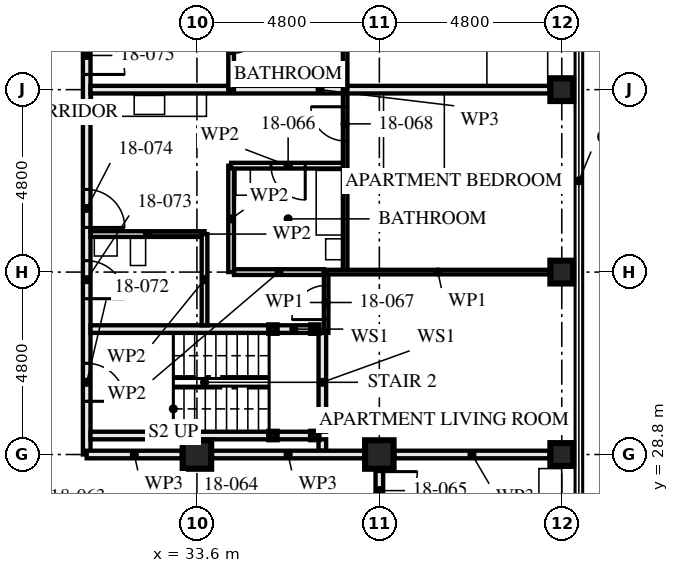
"""IFC4 building model, lengths in metres.
Left out: names, types, materials, properties, quantities, classifications, styles, units other than length and angle.
Written with IfcOpenShell. Run it as: python <this file> out.ifc"""

import sys

from ifc_helpers import new_model, si_unit, direction, frame, frame_2d, origin, origin_2d, place, context, subcontext, project, spatial, rectangle, hollow_rectangle, extrude, element, fill, save


model = new_model("IFC4")
c1 = context("Model", 3, precision=1e-05, world=origin(), true_north=direction((0.0, 1.0)))
c2 = subcontext(c1, "Body", "Model", "MODEL_VIEW")
j1 = project(units=[si_unit("LENGTHUNIT", "METRE"), si_unit("PLANEANGLEUNIT", "RADIAN")], contexts=[c1])
p1 = place(None, origin())
s1 = spatial("IfcSite", under=j1, at=p1, CompositionType="ELEMENT")
p2 = place(p1, origin())
s2 = spatial("IfcBuilding", under=s1, at=p2, CompositionType="ELEMENT")
p3 = place(p2, frame((0.0, 0.0, 69.0)))
s3 = spatial("IfcBuildingStorey", under=s2, at=p3, CompositionType="ELEMENT", Elevation=69.0)
for number, where, z_axis, x_axis in (
    (1, (33.6, 28.8, 0.0), (0.0, 0.0, 1.0), (0.0, 1.0, 0.0)),
    (2, (38.4, 28.8, 0.0), (0.0, 0.0, 1.0), (0.0, 1.0, 0.0)),
):
    element("IfcColumn", number, at=place(p3, frame(where, z_axis=z_axis, x_axis=x_axis)), inside=s3, PredefinedType="COLUMN", context=c2, shape_type="SweptSolid", body=[
        extrude(hollow_rectangle(XDim=0.75, YDim=0.75, WallThickness=0.08, at=origin_2d()), origin(), (0.0, 0.0, 1.0), 3.5),
    ])
for number, where, z_axis, x_axis in (
    (3, (43.2, 28.8, 0.0), (0.0, 0.0, 1.0), (0.0, 1.0, 0.0)),
    (4, (43.2, 33.6, 0.0), (0.0, 0.0, 1.0), (1.0, 0.0, 0.0)),
    (5, (43.2, 38.4, 0.0), (0.0, 0.0, 1.0), (1.0, 0.0, 0.0)),
):
    element("IfcColumn", number, at=place(p3, frame(where, z_axis=z_axis, x_axis=x_axis)), inside=s3, PredefinedType="COLUMN", context=c2, shape_type="SweptSolid", body=[
        extrude(hollow_rectangle(XDim=0.6, YDim=0.6, WallThickness=0.08, at=origin_2d()), origin(), (0.0, 0.0, 1.0), 3.5),
    ])
for number, where, z_axis, x_axis in (
    (6, (36.7, 29.3, 0.0), (0.0, 0.0, 1.0), (1.0, 0.0, 0.0)),
    (7, (36.7, 32.1, 0.0), (0.0, 0.0, 1.0), (1.0, 0.0, 0.0)),
    (8, (35.6, 29.3, 0.0), (0.0, 0.0, 1.0), (1.0, 0.0, 0.0)),
    (9, (35.6, 32.1, 0.0), (0.0, 0.0, 1.0), (1.0, 0.0, 0.0)),
):
    element("IfcColumn", number, at=place(p3, frame(where, z_axis=z_axis, x_axis=x_axis)), inside=s3, PredefinedType="COLUMN", context=c2, shape_type="SweptSolid", body=[
        extrude(hollow_rectangle(XDim=0.2, YDim=0.2, WallThickness=0.008, at=origin_2d()), origin(), (0.0, 0.0, 1.0), 3.33),
    ])
p4 = place(p3, frame((38.4, 26.8, 0.0), z_axis=(0.0, 0.0, 1.0), x_axis=(0.0, 1.0, 0.0)))
e10 = element("IfcWall", 10, at=p4, inside=s3, PredefinedType="PARTITIONING", context=c2, shape_type="SweptSolid", body=[
    extrude(rectangle(XDim=1.605, YDim=0.2, at=frame_2d((0.802, 0.0))), origin(), (0.0, 0.0, 1.0), 3.33),
])
p5 = place(p4, frame((0.55, 0.0, 0.0)))
e11 = element("IfcOpeningElement", 11, at=p5, cuts=e10, PredefinedType="OPENING", context=c2, shape_type="SweptSolid", body=[
    extrude(rectangle(XDim=1.0, YDim=2.1, at=frame_2d((0.5, 1.05))), frame((0.0, 0.111, 0.0), z_axis=(0.0, -1.0, 0.0), x_axis=(1.0, 0.0, 0.0)), (0.0, 0.0, 1.0), 0.221),
])
p6 = place(p3, frame((36.6, 29.3, 0.0), z_axis=(0.0, 0.0, 1.0), x_axis=(-1.0, 0.0, 0.0)))
e12 = element("IfcWall", 12, at=p6, inside=s3, PredefinedType="SOLIDWALL", context=c2, shape_type="SweptSolid", body=[
    extrude(rectangle(XDim=0.9, YDim=0.2, at=frame_2d((0.45, 0.0))), origin(), (0.0, 0.0, 1.0), 2.99),
])
p7 = place(p3, frame((35.5, 29.3, 0.0), z_axis=(0.0, 0.0, 1.0), x_axis=(-1.0, 0.0, 0.0)))
e13 = element("IfcWall", 13, at=p7, inside=s3, PredefinedType="SOLIDWALL", context=c2, shape_type="SweptSolid", body=[
    extrude(rectangle(XDim=4.7, YDim=0.2, at=frame_2d((2.35, 0.0))), origin(), (0.0, 0.0, 1.0), 2.99),
])
p8 = place(p3, frame((36.6, 32.1, 0.0), z_axis=(0.0, 0.0, 1.0), x_axis=(-1.0, 0.0, 0.0)))
e14 = element("IfcWall", 14, at=p8, inside=s3, PredefinedType="SOLIDWALL", context=c2, shape_type="SweptSolid", body=[
    extrude(rectangle(XDim=0.9, YDim=0.2, at=frame_2d((0.45, 0.0))), origin(), (0.0, 0.0, 1.0), 2.99),
])
p9 = place(p3, frame((35.5, 32.1, 0.0), z_axis=(0.0, 0.0, 1.0), x_axis=(-1.0, 0.0, 0.0)))
e15 = element("IfcWall", 15, at=p9, inside=s3, PredefinedType="SOLIDWALL", context=c2, shape_type="SweptSolid", body=[
    extrude(rectangle(XDim=4.7, YDim=0.2, at=frame_2d((2.35, 0.0))), origin(), (0.0, 0.0, 1.0), 2.99),
])
p10 = place(p3, frame((36.9, 28.9, 0.0), z_axis=(0.0, 0.0, 1.0), x_axis=(0.0, 1.0, 0.0)))
e16 = element("IfcWall", 16, at=p10, inside=s3, PredefinedType="SOLIDWALL", context=c2, shape_type="SweptSolid", body=[
    extrude(rectangle(XDim=0.3, YDim=0.2, at=frame_2d((0.15, 0.0))), origin(), (0.0, 0.0, 1.0), 3.33),
])
p11 = place(p3, frame((36.9, 29.4, 0.0), z_axis=(0.0, 0.0, 1.0), x_axis=(0.0, 1.0, 0.0)))
e17 = element("IfcWall", 17, at=p11, inside=s3, PredefinedType="SOLIDWALL", context=c2, shape_type="SweptSolid", body=[
    extrude(rectangle(XDim=2.6, YDim=0.2, at=frame_2d((1.3, 0.0))), origin(), (0.0, 0.0, 1.0), 3.33),
])
p12 = place(p3, frame((33.8, 32.2, 0.0), z_axis=(0.0, 0.0, 1.0), x_axis=(0.0, 1.0, 0.0)))
e18 = element("IfcWall", 18, at=p12, inside=s3, PredefinedType="PARTITIONING", context=c2, shape_type="SweptSolid", body=[
    extrude(rectangle(XDim=2.4, YDim=0.15, at=frame_2d((1.2, 0.0))), origin(), (0.0, 0.0, 1.0), 2.55),
])
p13 = place(p3, frame((33.8, 34.6, 0.0), z_axis=(0.0, 0.0, 1.0), x_axis=(-1.0, 0.0, 0.0)))
e19 = element("IfcWall", 19, at=p13, inside=s3, PredefinedType="PARTITIONING", context=c2, shape_type="SweptSolid", body=[
    extrude(rectangle(XDim=3.0, YDim=0.15, at=frame_2d((1.5, 0.0))), origin(), (0.0, 0.0, 1.0), 3.33),
])
p14 = place(p3, frame((37.5, 36.4, 0.0), z_axis=(0.0, 0.0, 1.0), x_axis=(-1.0, 0.0, 0.0)))
e20 = element("IfcWall", 20, at=p14, inside=s3, PredefinedType="PARTITIONING", context=c2, shape_type="SweptSolid", body=[
    extrude(rectangle(XDim=3.0, YDim=0.15, at=frame_2d((1.5, 0.0))), origin(), (0.0, 0.0, 1.0), 3.33),
])
p15 = place(p14, frame((1.05, 0.0, 0.0)))
e21 = element("IfcOpeningElement", 21, at=p15, cuts=e20, PredefinedType="OPENING", context=c2, shape_type="SweptSolid", body=[
    extrude(rectangle(XDim=0.9, YDim=2.1, at=frame_2d((0.45, 1.05))), frame((0.0, 0.085, 0.0), z_axis=(0.0, -1.0, 0.0), x_axis=(1.0, 0.0, 0.0)), (0.0, 0.0, 1.0), 0.171),
])
p16 = place(p3, frame((34.5, 33.6, 0.0), z_axis=(0.0, 0.0, 1.0), x_axis=(0.0, 1.0, 0.0)))
e22 = element("IfcWall", 22, at=p16, inside=s3, PredefinedType="PARTITIONING", context=c2, shape_type="SweptSolid", body=[
    extrude(rectangle(XDim=2.8, YDim=0.15, at=frame_2d((1.4, 0.0))), origin(), (0.0, 0.0, 1.0), 3.33),
])
p17 = place(p3, frame((37.0, 32.0, 0.0), z_axis=(0.0, 0.0, 1.0), x_axis=(0.0, 1.0, 0.0)))
e23 = element("IfcWall", 23, at=p17, inside=s3, PredefinedType="PARTITIONING", context=c2, shape_type="SweptSolid", body=[
    extrude(rectangle(XDim=1.6, YDim=0.12, at=frame_2d((0.8, 0.0))), origin(), (0.0, 0.0, 1.0), 3.33),
])
p18 = place(p17, frame((0.35, 0.0, 0.0)))
e24 = element("IfcOpeningElement", 24, at=p18, cuts=e23, PredefinedType="OPENING", context=c2, shape_type="SweptSolid", body=[
    extrude(rectangle(XDim=0.9, YDim=2.1, at=frame_2d((0.45, 1.05))), frame((0.0, 0.071, 0.0), z_axis=(0.0, -1.0, 0.0), x_axis=(1.0, 0.0, 0.0)), (0.0, 0.0, 1.0), 0.141),
])
p19 = place(p3, frame((37.5, 33.6, 0.0), z_axis=(0.0, 0.0, 1.0), x_axis=(0.0, 1.0, 0.0)))
e25 = element("IfcWall", 25, at=p19, inside=s3, PredefinedType="PARTITIONING", context=c2, shape_type="SweptSolid", body=[
    extrude(rectangle(XDim=4.8, YDim=0.12, at=frame_2d((2.4, 0.0))), origin(), (0.0, 0.0, 1.0), 3.33),
])
p20 = place(p19, frame((3.45, 0.0, 0.0)))
e26 = element("IfcOpeningElement", 26, at=p20, cuts=e25, PredefinedType="OPENING", context=c2, shape_type="SweptSolid", body=[
    extrude(rectangle(XDim=0.9, YDim=2.1, at=frame_2d((0.45, 1.05))), frame((0.0, 0.071, 0.0), z_axis=(0.0, -1.0, 0.0), x_axis=(1.0, 0.0, 0.0)), (0.0, 0.0, 1.0), 0.141),
])
p21 = place(p3, frame((42.88, 33.6, 0.0), z_axis=(0.0, 0.0, 1.0), x_axis=(-1.0, 0.0, 0.0)))
e27 = element("IfcWall", 27, at=p21, inside=s3, PredefinedType="PARTITIONING", context=c2, shape_type="SweptSolid", body=[
    extrude(rectangle(XDim=5.88, YDim=0.12, at=frame_2d((2.94, 0.0))), origin(), (0.0, 0.0, 1.0), 2.55),
])
p22 = place(p3, frame((42.88, 38.4, 0.0), z_axis=(0.0, 0.0, 1.0), x_axis=(-1.0, 0.0, 0.0)))
e28 = element("IfcWall", 28, at=p22, inside=s3, PredefinedType="PARTITIONING", context=c2, shape_type="SweptSolid", body=[
    extrude(rectangle(XDim=12.08, YDim=0.2, at=frame_2d((6.04, 0.0))), origin(), (0.0, 0.0, 1.0), 2.55),
])
p23 = place(p3, frame((34.5, 38.4, 0.0), z_axis=(0.0, 0.0, 1.0), x_axis=(0.0, 1.0, 0.0)))
e29 = element("IfcWall", 29, at=p23, inside=s3, PredefinedType="PARTITIONING", context=c2, shape_type="SweptSolid", body=[
    extrude(rectangle(XDim=2.8, YDim=0.15, at=frame_2d((1.4, 0.0))), origin(), (0.0, 0.0, 1.0), 3.33),
])
p24 = place(p23, frame((0.95, 0.0, 0.0)))
e30 = element("IfcOpeningElement", 30, at=p24, cuts=e29, PredefinedType="OPENING", context=c2, shape_type="SweptSolid", body=[
    extrude(rectangle(XDim=0.9, YDim=2.1, at=frame_2d((0.45, 1.05))), frame((0.0, 0.085, 0.0), z_axis=(0.0, -1.0, 0.0), x_axis=(1.0, 0.0, 0.0)), (0.0, 0.0, 1.0), 0.171),
])
p25 = place(p3, frame((37.5, 38.4, 0.0), z_axis=(0.0, 0.0, 1.0), x_axis=(0.0, 1.0, 0.0)))
e31 = element("IfcWall", 31, at=p25, inside=s3, PredefinedType="PARTITIONING", context=c2, shape_type="SweptSolid", body=[
    extrude(rectangle(XDim=4.8, YDim=0.12, at=frame_2d((2.4, 0.0))), origin(), (0.0, 0.0, 1.0), 3.33),
])
p26 = place(p25, frame((3.45, 0.0, 0.0)))
e32 = element("IfcOpeningElement", 32, at=p26, cuts=e31, PredefinedType="OPENING", context=c2, shape_type="SweptSolid", body=[
    extrude(rectangle(XDim=0.9, YDim=2.1, at=frame_2d((0.45, 1.05))), frame((0.0, 0.071, 0.0), z_axis=(0.0, -1.0, 0.0), x_axis=(1.0, 0.0, 0.0)), (0.0, 0.0, 1.0), 0.141),
])
p27 = place(p3, frame((30.7, 28.8, 0.0), z_axis=(0.0, 0.0, 1.0), x_axis=(0.0, 1.0, 0.0)))
e33 = element("IfcWall", 33, at=p27, inside=s3, PredefinedType="PARTITIONING", context=c2, shape_type="SweptSolid", body=[
    extrude(rectangle(XDim=14.4, YDim=0.2, at=frame_2d((7.2, 0.0))), origin(), (0.0, 0.0, 1.0), 2.55),
])
p28 = place(p27, frame((1.4, 0.0, 0.0)))
e34 = element("IfcOpeningElement", 34, at=p28, cuts=e33, PredefinedType="OPENING", context=c2, shape_type="SweptSolid", body=[
    extrude(rectangle(XDim=1.0, YDim=2.1, at=frame_2d((0.5, 1.05))), frame((0.0, 0.111, 0.0), z_axis=(0.0, -1.0, 0.0), x_axis=(1.0, 0.0, 0.0)), (0.0, 0.0, 1.0), 0.221),
])
p29 = place(p27, frame((4.1, 0.0, 0.0)))
e35 = element("IfcOpeningElement", 35, at=p29, cuts=e33, PredefinedType="OPENING", context=c2, shape_type="SweptSolid", body=[
    extrude(rectangle(XDim=1.0, YDim=2.1, at=frame_2d((0.5, 1.05))), frame((0.0, 0.111, 0.0), z_axis=(0.0, -1.0, 0.0), x_axis=(1.0, 0.0, 0.0)), (0.0, 0.0, 1.0), 0.221),
])
p30 = place(p27, frame((5.975, 0.0, 0.0)))
e36 = element("IfcOpeningElement", 36, at=p30, cuts=e33, PredefinedType="OPENING", context=c2, shape_type="SweptSolid", body=[
    extrude(rectangle(XDim=1.0, YDim=2.1, at=frame_2d((0.5, 1.05))), frame((0.0, 0.111, 0.0), z_axis=(0.0, -1.0, 0.0), x_axis=(1.0, 0.0, 0.0)), (0.0, 0.0, 1.0), 0.221),
])
p31 = place(p27, frame((10.0, 0.0, 0.0)))
e37 = element("IfcOpeningElement", 37, at=p31, cuts=e33, PredefinedType="OPENING", context=c2, shape_type="SweptSolid", body=[
    extrude(rectangle(XDim=1.0, YDim=2.1, at=frame_2d((0.5, 1.05))), frame((0.0, 0.111, 0.0), z_axis=(0.0, -1.0, 0.0), x_axis=(1.0, 0.0, 0.0)), (0.0, 0.0, 1.0), 0.221),
])
p32 = place(p3, frame((42.88, 28.8, 0.0), z_axis=(0.0, 0.0, 1.0), x_axis=(-1.0, 0.0, 0.0)))
e38 = element("IfcWall", 38, at=p32, inside=s3, PredefinedType="PARTITIONING", context=c2, shape_type="SweptSolid", body=[
    extrude(rectangle(XDim=4.085, YDim=0.2, at=frame_2d((2.042, 0.0))), origin(), (0.0, 0.0, 1.0), 2.32),
])
p33 = place(p3, frame((38.005, 28.8, 0.0), z_axis=(0.0, 0.0, 1.0), x_axis=(-1.0, 0.0, 0.0)))
e39 = element("IfcWall", 39, at=p33, inside=s3, PredefinedType="PARTITIONING", context=c2, shape_type="SweptSolid", body=[
    extrude(rectangle(XDim=4.01, YDim=0.2, at=frame_2d((2.005, 0.0))), origin(), (0.0, 0.0, 1.0), 2.32),
])
p34 = place(p3, frame((33.205, 28.8, 0.0), z_axis=(0.0, 0.0, 1.0), x_axis=(-1.0, 0.0, 0.0)))
e40 = element("IfcWall", 40, at=p34, inside=s3, PredefinedType="PARTITIONING", context=c2, shape_type="SweptSolid", body=[
    extrude(rectangle(XDim=2.505, YDim=0.2, at=frame_2d((1.252, 0.0))), origin(), (0.0, 0.0, 1.0), 2.32),
])
p35 = place(p3, frame((36.94, 33.6, 0.0), z_axis=(0.0, 0.0, 1.0), x_axis=(-1.0, 0.0, 0.0)))
e41 = element("IfcWall", 41, at=p35, inside=s3, PredefinedType="PARTITIONING", context=c2, shape_type="SweptSolid", body=[
    extrude(rectangle(XDim=2.365, YDim=0.15, at=frame_2d((1.183, 0.0))), origin(), (0.0, 0.0, 1.0), 2.55),
])
p36 = place(p5, frame((1.0, 0.0, 0.0), z_axis=(0.0, 0.0, 1.0), x_axis=(-1.0, 0.0, 0.0)))
e42 = element("IfcDoor", 42, at=p36, inside=s3, OperationType="SINGLE_SWING_RIGHT", PredefinedType="DOOR", context=c2, shape_type="SweptSolid", body=[
    extrude(rectangle(XDim=1.0, YDim=2.1, at=frame_2d((0.5, 1.05))), frame((0.0, 0.027, 0.0), z_axis=(0.0, -1.0, 0.0), x_axis=(1.0, 0.0, 0.0)), (0.0, 0.0, 1.0), 0.054),
])
fill(e11, e42)
p37 = place(p15, origin())
e43 = element("IfcDoor", 43, at=p37, inside=s3, OperationType="SINGLE_SWING_RIGHT", PredefinedType="DOOR", context=c2, shape_type="SweptSolid", body=[
    extrude(rectangle(XDim=0.9, YDim=2.1, at=frame_2d((0.45, 1.05))), frame((0.0, 0.022, 0.0), z_axis=(0.0, -1.0, 0.0), x_axis=(1.0, 0.0, 0.0)), (0.0, 0.0, 1.0), 0.044),
])
fill(e21, e43)
p38 = place(p18, origin())
e44 = element("IfcDoor", 44, at=p38, inside=s3, OperationType="SINGLE_SWING_RIGHT", PredefinedType="DOOR", context=c2, shape_type="SweptSolid", body=[
    extrude(rectangle(XDim=0.9, YDim=2.1, at=frame_2d((0.45, 1.05))), frame((0.0, 0.022, 0.0), z_axis=(0.0, -1.0, 0.0), x_axis=(1.0, 0.0, 0.0)), (0.0, 0.0, 1.0), 0.044),
])
fill(e24, e44)
p39 = place(p20, origin())
e45 = element("IfcDoor", 45, at=p39, inside=s3, OperationType="SINGLE_SWING_LEFT", PredefinedType="DOOR", context=c2, shape_type="SweptSolid", body=[
    extrude(rectangle(XDim=0.9, YDim=2.1, at=frame_2d((0.45, 1.05))), frame((0.0, 0.022, 0.0), z_axis=(0.0, -1.0, 0.0), x_axis=(1.0, 0.0, 0.0)), (0.0, 0.0, 1.0), 0.044),
])
fill(e26, e45)
p40 = place(p24, frame((0.9, 0.0, 0.0), z_axis=(0.0, 0.0, 1.0), x_axis=(-1.0, 0.0, 0.0)))
e46 = element("IfcDoor", 46, at=p40, inside=s3, OperationType="SINGLE_SWING_RIGHT", PredefinedType="DOOR", context=c2, shape_type="SweptSolid", body=[
    extrude(rectangle(XDim=0.9, YDim=2.1, at=frame_2d((0.45, 1.05))), frame((0.0, 0.022, 0.0), z_axis=(0.0, -1.0, 0.0), x_axis=(1.0, 0.0, 0.0)), (0.0, 0.0, 1.0), 0.044),
])
fill(e30, e46)
p41 = place(p28, frame((1.0, 0.0, 0.0), z_axis=(0.0, 0.0, 1.0), x_axis=(-1.0, 0.0, 0.0)))
e47 = element("IfcDoor", 47, at=p41, inside=s3, OperationType="SINGLE_SWING_LEFT", PredefinedType="DOOR", context=c2, shape_type="SweptSolid", body=[
    extrude(rectangle(XDim=1.0, YDim=2.1, at=frame_2d((0.5, 1.05))), frame((0.0, 0.032, 0.0), z_axis=(0.0, -1.0, 0.0), x_axis=(1.0, 0.0, 0.0)), (0.0, 0.0, 1.0), 0.064),
])
fill(e34, e47)
p42 = place(p29, frame((1.0, 0.0, 0.0), z_axis=(0.0, 0.0, 1.0), x_axis=(-1.0, 0.0, 0.0)))
e48 = element("IfcDoor", 48, at=p42, inside=s3, OperationType="SINGLE_SWING_LEFT", PredefinedType="DOOR", context=c2, shape_type="SweptSolid", body=[
    extrude(rectangle(XDim=1.0, YDim=2.1, at=frame_2d((0.5, 1.05))), frame((0.0, 0.027, 0.0), z_axis=(0.0, -1.0, 0.0), x_axis=(1.0, 0.0, 0.0)), (0.0, 0.0, 1.0), 0.054),
])
fill(e35, e48)
p43 = place(p30, frame((1.0, 0.0, 0.0), z_axis=(0.0, 0.0, 1.0), x_axis=(-1.0, 0.0, 0.0)))
e49 = element("IfcDoor", 49, at=p43, inside=s3, OperationType="SINGLE_SWING_LEFT", PredefinedType="DOOR", context=c2, shape_type="SweptSolid", body=[
    extrude(rectangle(XDim=1.0, YDim=2.1, at=frame_2d((0.5, 1.05))), frame((0.0, 0.027, 0.0), z_axis=(0.0, -1.0, 0.0), x_axis=(1.0, 0.0, 0.0)), (0.0, 0.0, 1.0), 0.054),
])
fill(e36, e49)
p44 = place(p31, frame((1.0, 0.0, 0.0), z_axis=(0.0, 0.0, 1.0), x_axis=(-1.0, 0.0, 0.0)))
e50 = element("IfcDoor", 50, at=p44, inside=s3, OperationType="SINGLE_SWING_LEFT", PredefinedType="DOOR", context=c2, shape_type="SweptSolid", body=[
    extrude(rectangle(XDim=1.0, YDim=2.1, at=frame_2d((0.5, 1.05))), frame((0.0, 0.027, 0.0), z_axis=(0.0, -1.0, 0.0), x_axis=(1.0, 0.0, 0.0)), (0.0, 0.0, 1.0), 0.054),
])
fill(e37, e50)
save(model, sys.argv[1])
